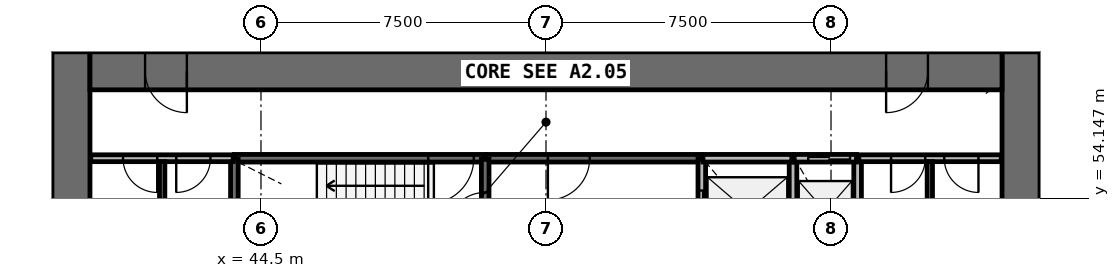
"""IFC4 building model, lengths in metres.
Left out: names, types, materials, properties, quantities, classifications, styles, units other than length and angle.
Written with IfcOpenShell. Run it as: python <this file> out.ifc"""

import sys

from ifc_helpers import new_model, si_unit, direction, frame, frame_2d, origin, place, context, subcontext, project, spatial, rectangle, extrude, source, transform, mapped, element, fill, save


model = new_model("IFC4")
c1 = context("Model", 3, precision=1e-05, world=origin(), true_north=direction((0.0, 1.0)))
c2 = subcontext(c1, "Body", "Model", "MODEL_VIEW")
j1 = project(units=[si_unit("LENGTHUNIT", "METRE"), si_unit("PLANEANGLEUNIT", "RADIAN")], contexts=[c1])
p1 = place(None, origin())
s1 = spatial("IfcSite", under=j1, at=p1, CompositionType="ELEMENT")
p2 = place(p1, origin())
s2 = spatial("IfcBuilding", under=s1, at=p2, CompositionType="ELEMENT")
p3 = place(p2, frame((0.0, 0.0, 18.2)))
s3 = spatial("IfcBuildingStorey", under=s2, at=p3, CompositionType="ELEMENT", Elevation=18.2)
p4 = place(p3, frame((64.5, 38.0, 0.0), z_axis=(0.0, 0.0, 1.0), x_axis=(0.0, 1.0, 0.0)))
e1 = element("IfcWall", 1, at=p4, inside=s3, PredefinedType="SHEAR", context=c2, shape_type="SweptSolid", body=[
    extrude(rectangle(XDim=20.0, YDim=1.0, at=frame_2d((10.0, 0.0))), origin(), (0.0, 0.0, 1.0), 4.4),
])
p5 = place(p4, frame((9.1, 0.0, 0.0)))
e2 = element("IfcOpeningElement", 2, at=p5, cuts=e1, PredefinedType="OPENING", context=c2, shape_type="SweptSolid", body=[
    extrude(rectangle(XDim=1.8, YDim=2.1, at=frame_2d((0.9, 1.05))), frame((0.0, 0.51, 0.0), z_axis=(0.0, -1.0, 0.0), x_axis=(1.0, 0.0, 0.0)), (0.0, 0.0, 1.0), 1.02),
])
p6 = place(p3, frame((39.5, 58.0, 0.0), z_axis=(0.0, 0.0, 1.0), x_axis=(0.0, -1.0, 0.0)))
e3 = element("IfcWall", 3, at=p6, inside=s3, PredefinedType="SHEAR", context=c2, shape_type="SweptSolid", body=[
    extrude(rectangle(XDim=20.0, YDim=1.0, at=frame_2d((10.0, 0.0))), origin(), (0.0, 0.0, 1.0), 4.4),
])
p7 = place(p6, frame((9.1, 0.0, 0.0)))
e4 = element("IfcOpeningElement", 4, at=p7, cuts=e3, PredefinedType="OPENING", context=c2, shape_type="SweptSolid", body=[
    extrude(rectangle(XDim=1.8, YDim=2.1, at=frame_2d((0.9, 1.05))), frame((0.0, 0.51, 0.0), z_axis=(0.0, -1.0, 0.0), x_axis=(1.0, 0.0, 0.0)), (0.0, 0.0, 1.0), 1.02),
])
p8 = place(p3, frame((64.0, 57.5, 0.0), z_axis=(0.0, 0.0, 1.0), x_axis=(-1.0, 0.0, 0.0)))
e5 = element("IfcWall", 5, at=p8, inside=s3, PredefinedType="SHEAR", context=c2, shape_type="SweptSolid", body=[
    extrude(rectangle(XDim=24.0, YDim=1.0, at=frame_2d((12.0, 0.0))), origin(), (0.0, 0.0, 1.0), 4.4),
])
p9 = place(p8, frame((21.45, 0.0, 0.0)))
e6 = element("IfcOpeningElement", 6, at=p9, cuts=e5, PredefinedType="OPENING", context=c2, shape_type="SweptSolid", body=[
    extrude(rectangle(XDim=1.1, YDim=2.1, at=frame_2d((0.55, 1.05))), frame((0.0, 0.51, 0.0), z_axis=(0.0, -1.0, 0.0), x_axis=(1.0, 0.0, 0.0)), (0.0, 0.0, 1.0), 1.02),
])
p10 = place(p8, frame((1.95, 0.0, 0.0)))
e7 = element("IfcOpeningElement", 7, at=p10, cuts=e5, PredefinedType="OPENING", context=c2, shape_type="SweptSolid", body=[
    extrude(rectangle(XDim=1.1, YDim=2.1, at=frame_2d((0.55, 1.05))), frame((0.0, 0.51, 0.0), z_axis=(0.0, -1.0, 0.0), x_axis=(1.0, 0.0, 0.0)), (0.0, 0.0, 1.0), 1.02),
])
p11 = place(p3, frame((50.4, 55.2, 0.0), z_axis=(0.0, 0.0, 1.0), x_axis=(-1.0, 0.0, 0.0)))
e8 = element("IfcWall", 8, at=p11, inside=s3, PredefinedType="SOLIDWALL", context=c2, shape_type="SweptSolid", body=[
    extrude(rectangle(XDim=6.6, YDim=0.2, at=frame_2d((3.3, 0.0))), origin(), (0.0, 0.0, 1.0), 3.95),
])
p12 = place(p11, frame((0.3, 0.0, 0.0)))
e9 = element("IfcOpeningElement", 9, at=p12, cuts=e8, PredefinedType="OPENING", context=c2, shape_type="SweptSolid", body=[
    extrude(rectangle(XDim=1.2, YDim=2.1, at=frame_2d((0.6, 1.05))), frame((0.0, 0.11, 0.0), z_axis=(0.0, -1.0, 0.0), x_axis=(1.0, 0.0, 0.0)), (0.0, 0.0, 1.0), 0.22),
])
p13 = place(p3, frame((56.1, 55.2, 0.0), z_axis=(0.0, 0.0, 1.0), x_axis=(-1.0, 0.0, 0.0)))
e10 = element("IfcWall", 10, at=p13, inside=s3, PredefinedType="SOLIDWALL", context=c2, shape_type="SweptSolid", body=[
    extrude(rectangle(XDim=5.67, YDim=0.2, at=frame_2d((2.835, 0.0))), origin(), (0.0, 0.0, 1.0), 3.95),
])
p14 = place(p13, frame((2.95, 0.0, 0.0)))
e11 = element("IfcOpeningElement", 11, at=p14, cuts=e10, PredefinedType="OPENING", context=c2, shape_type="SweptSolid", body=[
    extrude(rectangle(XDim=1.1, YDim=2.1, at=frame_2d((0.55, 1.05))), frame((0.0, 0.11, 0.0), z_axis=(0.0, -1.0, 0.0), x_axis=(1.0, 0.0, 0.0)), (0.0, 0.0, 1.0), 0.22),
])
p15 = place(p3, frame((50.4, 52.4, 0.0), z_axis=(0.0, 0.0, 1.0), x_axis=(0.0, 1.0, 0.0)))
e12 = element("IfcWall", 12, at=p15, inside=s3, PredefinedType="SOLIDWALL", context=c2, shape_type="SweptSolid", body=[
    extrude(rectangle(XDim=2.77, YDim=0.2, at=frame_2d((1.385, 0.0))), origin(), (0.0, 0.0, 1.0), 3.95),
])
p16 = place(p15, frame((0.9, 0.0, 0.0)))
e13 = element("IfcOpeningElement", 13, at=p16, cuts=e12, PredefinedType="OPENING", context=c2, shape_type="SweptSolid", body=[
    extrude(rectangle(XDim=1.0, YDim=2.1, at=frame_2d((0.5, 1.05))), frame((0.0, 0.11, 0.0), z_axis=(0.0, -1.0, 0.0), x_axis=(1.0, 0.0, 0.0)), (0.0, 0.0, 1.0), 0.22),
])
p17 = place(p3, frame((56.1, 55.17, 0.0), z_axis=(0.0, 0.0, 1.0), x_axis=(0.0, -1.0, 0.0)))
e14 = element("IfcWall", 14, at=p17, inside=s3, PredefinedType="SOLIDWALL", context=c2, shape_type="SweptSolid", body=[
    extrude(rectangle(XDim=2.77, YDim=0.2, at=frame_2d((1.385, 0.0))), origin(), (0.0, 0.0, 1.0), 3.95),
])
p18 = place(p17, frame((0.82, 0.0, 0.0)))
e15 = element("IfcOpeningElement", 15, at=p18, cuts=e14, PredefinedType="OPENING", context=c2, shape_type="SweptSolid", body=[
    extrude(rectangle(XDim=1.1, YDim=2.1, at=frame_2d((0.55, 1.05))), frame((0.0, 0.11, 0.0), z_axis=(0.0, -1.0, 0.0), x_axis=(1.0, 0.0, 0.0)), (0.0, 0.0, 1.0), 0.22),
])
for number, where, z_axis, x_axis in (
    (16, (58.5, 52.4, 0.0), (0.0, 0.0, 1.0), (0.0, 1.0, 0.0)),
    (17, (60.2, 52.4, 0.0), (0.0, 0.0, 1.0), (0.0, 1.0, 0.0)),
):
    element("IfcWall", number, at=place(p3, frame(where, z_axis=z_axis, x_axis=x_axis)), inside=s3, PredefinedType="SOLIDWALL", context=c2, shape_type="SweptSolid", body=[
        extrude(rectangle(XDim=2.8, YDim=0.2, at=frame_2d((1.4, 0.0))), origin(), (0.0, 0.0, 1.0), 3.95),
    ])
p19 = place(p3, frame((58.47, 55.2, 0.0), z_axis=(0.0, 0.0, 1.0), x_axis=(-1.0, 0.0, 0.0)))
e18 = element("IfcWall", 18, at=p19, inside=s3, PredefinedType="SOLIDWALL", context=c2, shape_type="SweptSolid", body=[
    extrude(rectangle(XDim=2.34, YDim=0.2, at=frame_2d((1.17, 0.0))), origin(), (0.0, 0.0, 1.0), 3.95),
])
p20 = place(p3, frame((43.8, 55.17, 0.0), z_axis=(0.0, 0.0, 1.0), x_axis=(0.0, -1.0, 0.0)))
e19 = element("IfcWall", 19, at=p20, inside=s3, PredefinedType="SOLIDWALL", context=c2, shape_type="SweptSolid", body=[
    extrude(rectangle(XDim=2.14, YDim=0.2, at=frame_2d((1.07, 0.0))), origin(), (0.0, 0.0, 1.0), 3.95),
])
p21 = place(p3, frame((60.17, 55.2, 0.0), z_axis=(0.0, 0.0, 1.0), x_axis=(-1.0, 0.0, 0.0)))
e20 = element("IfcWall", 20, at=p21, inside=s3, PredefinedType="SOLIDWALL", context=c2, shape_type="SweptSolid", body=[
    extrude(rectangle(XDim=1.64, YDim=0.2, at=frame_2d((0.82, 0.0))), origin(), (0.0, 0.0, 1.0), 3.95),
])
p22 = place(p21, frame((0.17, 0.0, 0.0)))
e21 = element("IfcOpeningElement", 21, at=p22, cuts=e20, PredefinedType="OPENING", context=c2, shape_type="SweptSolid", body=[
    extrude(rectangle(XDim=1.1, YDim=2.1, at=frame_2d((0.55, 1.05))), frame((0.0, 0.11, 0.0), z_axis=(0.0, -1.0, 0.0), x_axis=(1.0, 0.0, 0.0)), (0.0, 0.0, 1.0), 0.22),
])
p23 = place(p3, frame((43.77, 55.2, 0.0), z_axis=(0.0, 0.0, 1.0), x_axis=(-1.0, 0.0, 0.0)))
e22 = element("IfcWall", 22, at=p23, inside=s3, PredefinedType="PARTITIONING", context=c2, shape_type="SweptSolid", body=[
    extrude(rectangle(XDim=3.75, YDim=0.18, at=frame_2d((1.875, 0.0))), origin(), (0.0, 0.0, 1.0), 3.95),
])
p24 = place(p23, frame((2.0, 0.0, 0.0)))
e23 = element("IfcOpeningElement", 23, at=p24, cuts=e22, PredefinedType="OPENING", context=c2, shape_type="SweptSolid", body=[
    extrude(rectangle(XDim=0.9, YDim=2.1, at=frame_2d((0.45, 1.05))), frame((0.0, 0.1, 0.0), z_axis=(0.0, -1.0, 0.0), x_axis=(1.0, 0.0, 0.0)), (0.0, 0.0, 1.0), 0.2),
])
p25 = place(p23, frame((0.6, 0.0, 0.0)))
e24 = element("IfcOpeningElement", 24, at=p25, cuts=e22, PredefinedType="OPENING", context=c2, shape_type="SweptSolid", body=[
    extrude(rectangle(XDim=0.9, YDim=2.1, at=frame_2d((0.45, 1.05))), frame((0.0, 0.1, 0.0), z_axis=(0.0, -1.0, 0.0), x_axis=(1.0, 0.0, 0.0)), (0.0, 0.0, 1.0), 0.2),
])
p26 = place(p3, frame((63.98, 55.2, 0.0), z_axis=(0.0, 0.0, 1.0), x_axis=(-1.0, 0.0, 0.0)))
e25 = element("IfcWall", 25, at=p26, inside=s3, PredefinedType="PARTITIONING", context=c2, shape_type="SweptSolid", body=[
    extrude(rectangle(XDim=3.75, YDim=0.18, at=frame_2d((1.875, 0.0))), origin(), (0.0, 0.0, 1.0), 3.95),
])
p27 = place(p26, frame((2.0, 0.0, 0.0)))
e26 = element("IfcOpeningElement", 26, at=p27, cuts=e25, PredefinedType="OPENING", context=c2, shape_type="SweptSolid", body=[
    extrude(rectangle(XDim=0.9, YDim=2.1, at=frame_2d((0.45, 1.05))), frame((0.0, 0.1, 0.0), z_axis=(0.0, -1.0, 0.0), x_axis=(1.0, 0.0, 0.0)), (0.0, 0.0, 1.0), 0.2),
])
p28 = place(p26, frame((0.6, 0.0, 0.0)))
e27 = element("IfcOpeningElement", 27, at=p28, cuts=e25, PredefinedType="OPENING", context=c2, shape_type="SweptSolid", body=[
    extrude(rectangle(XDim=0.9, YDim=2.1, at=frame_2d((0.45, 1.05))), frame((0.0, 0.1, 0.0), z_axis=(0.0, -1.0, 0.0), x_axis=(1.0, 0.0, 0.0)), (0.0, 0.0, 1.0), 0.2),
])
p29 = place(p3, frame((62.1, 52.4, 0.0), z_axis=(0.0, 0.0, 1.0), x_axis=(0.0, 1.0, 0.0)))
e28 = element("IfcWall", 28, at=p29, inside=s3, PredefinedType="PARTITIONING", context=c2, shape_type="SweptSolid", body=[
    extrude(rectangle(XDim=2.71, YDim=0.14, at=frame_2d((1.355, 0.0))), origin(), (0.0, 0.0, 1.0), 3.15),
])
p30 = place(p3, frame((41.9, 53.1, 0.0), z_axis=(0.0, 0.0, 1.0), x_axis=(0.0, 1.0, 0.0)))
e29 = element("IfcWall", 29, at=p30, inside=s3, PredefinedType="PARTITIONING", context=c2, shape_type="SweptSolid", body=[
    extrude(rectangle(XDim=2.01, YDim=0.14, at=frame_2d((1.005, 0.0))), origin(), (0.0, 0.0, 1.0), 3.15),
])
m1 = source(origin(), c2, "Body", "SweptSolid", [
    extrude(rectangle(XDim=1.1, YDim=2.1, at=frame_2d((0.55, 1.05))), frame((0.0, 0.025, 0.0), z_axis=(0.0, -1.0, 0.0), x_axis=(1.0, 0.0, 0.0)), (0.0, 0.0, 1.0), 0.05),
])
p31 = place(p18, origin())
e30 = element("IfcDoor", 30, at=p31, inside=s3, OperationType="DOUBLE_DOOR_SLIDING", PredefinedType="USERDEFINED", context=c2, shape_type="MappedRepresentation", body=[
    mapped(m1, transform((0.0, 0.0, 0.0), scale=1.0)),
])
fill(e15, e30)
p32 = place(p22, origin())
e31 = element("IfcDoor", 31, at=p32, inside=s3, OperationType="DOUBLE_DOOR_SLIDING", PredefinedType="USERDEFINED", context=c2, shape_type="MappedRepresentation", body=[
    mapped(m1, transform((0.0, 0.0, 0.0), scale=1.0)),
])
fill(e21, e31)
m2 = source(origin(), c2, "Body", "SweptSolid", [
    extrude(rectangle(XDim=1.2, YDim=2.1, at=frame_2d((0.6, 1.05))), frame((0.0, 0.025, 0.0), z_axis=(0.0, -1.0, 0.0), x_axis=(1.0, 0.0, 0.0)), (0.0, 0.0, 1.0), 0.05),
])
p33 = place(p12, origin())
e32 = element("IfcDoor", 32, at=p33, inside=s3, OperationType="SINGLE_SWING_RIGHT", PredefinedType="DOOR", context=c2, shape_type="MappedRepresentation", body=[
    mapped(m2, transform((0.0, 0.0, 0.0), scale=1.0)),
])
fill(e9, e32)
m3 = source(origin(), c2, "Body", "SweptSolid", [
    extrude(rectangle(XDim=1.0, YDim=2.1, at=frame_2d((0.5, 1.05))), frame((0.0, 0.025, 0.0), z_axis=(0.0, -1.0, 0.0), x_axis=(1.0, 0.0, 0.0)), (0.0, 0.0, 1.0), 0.05),
])
p34 = place(p16, origin())
e33 = element("IfcDoor", 33, at=p34, inside=s3, OperationType="SINGLE_SWING_LEFT", PredefinedType="DOOR", context=c2, shape_type="MappedRepresentation", body=[
    mapped(m3, transform((0.0, 0.0, 0.0), scale=1.0)),
])
fill(e13, e33)
m4 = source(origin(), c2, "Body", "SweptSolid", [
    extrude(rectangle(XDim=1.1, YDim=2.1, at=frame_2d((0.55, 1.05))), frame((0.0, 0.025, 0.0), z_axis=(0.0, -1.0, 0.0), x_axis=(1.0, 0.0, 0.0)), (0.0, 0.0, 1.0), 0.05),
])
p35 = place(p14, origin())
e34 = element("IfcDoor", 34, at=p35, inside=s3, OperationType="SINGLE_SWING_RIGHT", PredefinedType="DOOR", context=c2, shape_type="MappedRepresentation", body=[
    mapped(m4, transform((0.0, 0.0, 0.0), scale=1.0)),
])
fill(e11, e34)
m5 = source(origin(), c2, "Body", "SweptSolid", [
    extrude(rectangle(XDim=1.1, YDim=2.1, at=frame_2d((0.55, 1.05))), frame((0.0, 0.025, 0.0), z_axis=(0.0, -1.0, 0.0), x_axis=(1.0, 0.0, 0.0)), (0.0, 0.0, 1.0), 0.05),
])
p36 = place(p9, origin())
e35 = element("IfcDoor", 35, at=p36, inside=s3, OperationType="SINGLE_SWING_LEFT", PredefinedType="DOOR", context=c2, shape_type="MappedRepresentation", body=[
    mapped(m5, transform((0.0, 0.0, 0.0), scale=1.0)),
])
fill(e6, e35)
p37 = place(p10, origin())
e36 = element("IfcDoor", 36, at=p37, inside=s3, OperationType="SINGLE_SWING_RIGHT", PredefinedType="DOOR", context=c2, shape_type="MappedRepresentation", body=[
    mapped(m5, transform((0.0, 0.0, 0.0), scale=1.0)),
])
fill(e7, e36)
m6 = source(origin(), c2, "Body", "SweptSolid", [
    extrude(rectangle(XDim=0.9, YDim=2.1, at=frame_2d((0.45, 1.05))), frame((0.0, 0.025, 0.0), z_axis=(0.0, -1.0, 0.0), x_axis=(1.0, 0.0, 0.0)), (0.0, 0.0, 1.0), 0.05),
])
p38 = place(p24, origin())
e37 = element("IfcDoor", 37, at=p38, inside=s3, OperationType="SINGLE_SWING_LEFT", PredefinedType="DOOR", context=c2, shape_type="MappedRepresentation", body=[
    mapped(m6, transform((0.0, 0.0, 0.0), scale=1.0)),
])
fill(e23, e37)
p39 = place(p25, origin())
e38 = element("IfcDoor", 38, at=p39, inside=s3, OperationType="SINGLE_SWING_RIGHT", PredefinedType="DOOR", context=c2, shape_type="MappedRepresentation", body=[
    mapped(m6, transform((0.0, 0.0, 0.0), scale=1.0)),
])
fill(e24, e38)
p40 = place(p27, origin())
e39 = element("IfcDoor", 39, at=p40, inside=s3, OperationType="SINGLE_SWING_RIGHT", PredefinedType="DOOR", context=c2, shape_type="MappedRepresentation", body=[
    mapped(m6, transform((0.0, 0.0, 0.0), scale=1.0)),
])
fill(e26, e39)
p41 = place(p28, origin())
e40 = element("IfcDoor", 40, at=p41, inside=s3, OperationType="SINGLE_SWING_LEFT", PredefinedType="DOOR", context=c2, shape_type="MappedRepresentation", body=[
    mapped(m6, transform((0.0, 0.0, 0.0), scale=1.0)),
])
fill(e27, e40)
save(model, sys.argv[1])
